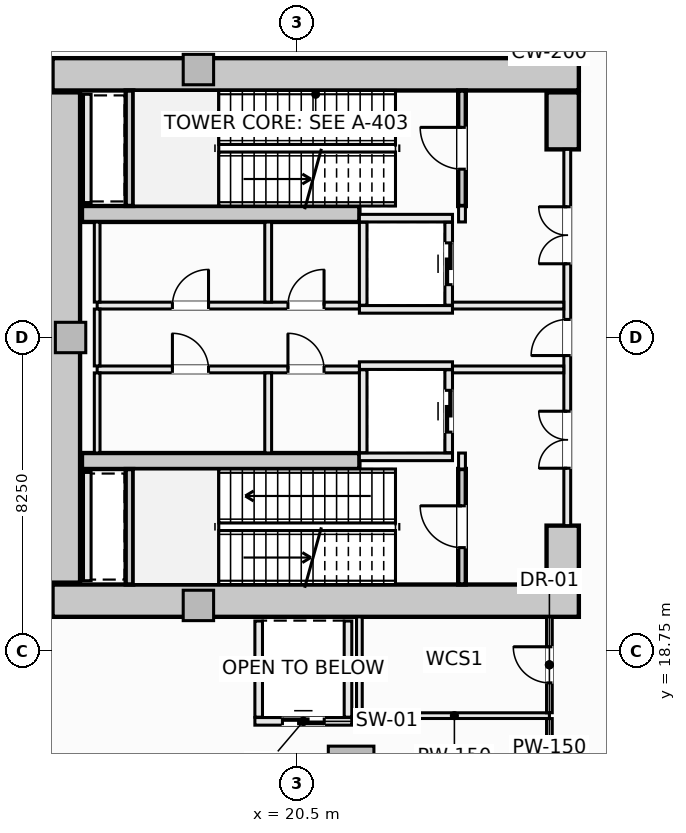
"""IFC4 building model, lengths in metres.
Left out: names, types, materials, properties, quantities, classifications, styles, units other than length and angle.
Written with IfcOpenShell. Run it as: python <this file> out.ifc"""

import sys

from ifc_helpers import new_model, si_unit, direction, frame, frame_2d, origin, origin_2d, place, context, subcontext, project, spatial, rectangle, extrude, element, fill, save


model = new_model("IFC4")
c1 = context("Model", 3, precision=1e-05, world=origin(), true_north=direction((0.0, 1.0)))
c2 = subcontext(c1, "Body", "Model", "MODEL_VIEW")
j1 = project(units=[si_unit("LENGTHUNIT", "METRE"), si_unit("PLANEANGLEUNIT", "RADIAN")], contexts=[c1])
p1 = place(None, origin())
s1 = spatial("IfcSite", under=j1, at=p1, CompositionType="ELEMENT")
p2 = place(p1, origin())
s2 = spatial("IfcBuilding", under=s1, at=p2, CompositionType="ELEMENT")
p3 = place(p2, frame((0.0, 0.0, 21.0)))
s3 = spatial("IfcBuildingStorey", under=s2, at=p3, CompositionType="ELEMENT", Elevation=21.0)
for number, where, z_axis, x_axis in (
    (1, (14.075, 33.925, -0.24), (0.0, 0.0, 1.0), (1.0, 0.0, 0.0)),
    (2, (14.075, 20.075, -0.24), (0.0, 0.0, 1.0), (1.0, 0.0, 0.0)),
):
    element("IfcWall", number, at=place(p3, frame(where, z_axis=z_axis, x_axis=x_axis)), inside=s3, PredefinedType="SHEAR", context=c2, shape_type="SweptSolid", body=[
        extrude(rectangle(XDim=13.85, YDim=0.85, at=frame_2d((6.925, 0.0))), origin(), (0.0, 0.0, 1.0), 5.46),
    ])
p4 = place(p3, frame((14.375, 20.55, -0.24), z_axis=(0.0, 0.0, 1.0), x_axis=(0.0, 1.0, 0.0)))
e3 = element("IfcWall", 3, at=p4, inside=s3, PredefinedType="SHEAR", context=c2, shape_type="SweptSolid", body=[
    extrude(rectangle(XDim=12.9, YDim=0.85, at=frame_2d((6.45, 0.0))), origin(), (0.0, 0.0, 1.0), 5.46),
])
for number, where, z_axis, x_axis in (
    (4, (27.5, 31.95, -0.24), (0.0, 0.0, 1.0), (0.0, 1.0, 0.0)),
    (5, (27.5, 20.55, -0.24), (0.0, 0.0, 1.0), (0.0, 1.0, 0.0)),
):
    element("IfcWall", number, at=place(p3, frame(where, z_axis=z_axis, x_axis=x_axis)), inside=s3, PredefinedType="SHEAR", context=c2, shape_type="SweptSolid", body=[
        extrude(rectangle(XDim=1.5, YDim=0.85, at=frame_2d((0.75, 0.0))), origin(), (0.0, 0.0, 1.0), 5.46),
    ])
for number, where, z_axis, x_axis in (
    (6, (14.85, 30.25, -0.24), (0.0, 0.0, 1.0), (1.0, 0.0, 0.0)),
    (7, (14.85, 23.75, -0.24), (0.0, 0.0, 1.0), (1.0, 0.0, 0.0)),
):
    element("IfcWall", number, at=place(p3, frame(where, z_axis=z_axis, x_axis=x_axis)), inside=s3, PredefinedType="SHEAR", context=c2, shape_type="SweptSolid", body=[
        extrude(rectangle(XDim=7.3, YDim=0.42, at=frame_2d((3.65, 0.0))), origin(), (0.0, 0.0, 1.0), 5.46),
    ])
p5 = place(p3, frame((21.932, 15.648, -0.24), z_axis=(0.0, 0.0, 1.0), x_axis=(1.0, 0.0, 0.0)))
e8 = element("IfcColumn", 8, at=p5, inside=s3, PredefinedType="COLUMN", context=c2, shape_type="SweptSolid", body=[
    extrude(rectangle(XDim=1.2, YDim=1.2, at=origin_2d()), origin(), (0.0, 0.0, 1.0), 5.46),
])
for number, where, z_axis, x_axis in (
    (9, (17.914, 34.05, -0.24), (0.0, 0.0, 1.0), (1.0, 0.0, 0.0)),
    (10, (14.55, 27.0, -0.24), (0.0, 0.0, 1.0), (1.0, 0.0, 0.0)),
    (11, (17.914, 19.95, -0.24), (0.0, 0.0, 1.0), (1.0, 0.0, 0.0)),
):
    element("IfcColumn", number, at=place(p3, frame(where, z_axis=z_axis, x_axis=x_axis)), inside=s3, PredefinedType="PILASTER", context=c2, shape_type="SweptSolid", body=[
        extrude(rectangle(XDim=0.8, YDim=0.8, at=origin_2d()), origin(), (0.0, 0.0, 1.0), 5.46),
    ])
p6 = place(p3, frame((24.85, 30.46, -0.24), z_axis=(0.0, 0.0, 1.0), x_axis=(0.0, 1.0, 0.0)))
e12 = element("IfcWall", 12, at=p6, inside=s3, PredefinedType="SHEAR", context=c2, shape_type="SweptSolid", body=[
    extrude(rectangle(XDim=3.038, YDim=0.2, at=frame_2d((1.519, 0.0))), origin(), (0.0, 0.0, 1.0), 5.46),
])
p7 = place(p6, frame((0.969, 0.0, 0.24)))
e13 = element("IfcOpeningElement", 13, at=p7, cuts=e12, PredefinedType="OPENING", context=c2, shape_type="SweptSolid", body=[
    extrude(rectangle(XDim=1.1, YDim=2.15, at=frame_2d((0.55, 1.075))), frame((0.0, 0.11, 0.0), z_axis=(0.0, -1.0, 0.0), x_axis=(1.0, 0.0, 0.0)), (0.0, 0.0, 1.0), 0.22),
])
p8 = place(p3, frame((16.1, 30.462, -0.24), z_axis=(0.0, 0.0, 1.0), x_axis=(0.0, 1.0, 0.0)))
e14 = element("IfcWall", 14, at=p8, inside=s3, PredefinedType="SHEAR", context=c2, shape_type="SweptSolid", body=[
    extrude(rectangle(XDim=3.036, YDim=0.2, at=frame_2d((1.518, 0.0))), origin(), (0.0, 0.0, 1.0), 5.46),
])
p9 = place(p3, frame((24.85, 20.502, -0.24), z_axis=(0.0, 0.0, 1.0), x_axis=(0.0, 1.0, 0.0)))
e15 = element("IfcWall", 15, at=p9, inside=s3, PredefinedType="SHEAR", context=c2, shape_type="SweptSolid", body=[
    extrude(rectangle(XDim=3.038, YDim=0.2, at=frame_2d((1.519, 0.0))), origin(), (0.0, 0.0, 1.0), 5.46),
])
p10 = place(p9, frame((0.969, 0.0, 0.24)))
e16 = element("IfcOpeningElement", 16, at=p10, cuts=e15, PredefinedType="OPENING", context=c2, shape_type="SweptSolid", body=[
    extrude(rectangle(XDim=1.1, YDim=2.15, at=frame_2d((0.55, 1.075))), frame((0.0, 0.11, 0.0), z_axis=(0.0, -1.0, 0.0), x_axis=(1.0, 0.0, 0.0)), (0.0, 0.0, 1.0), 0.22),
])
p11 = place(p3, frame((16.1, 20.502, -0.24), z_axis=(0.0, 0.0, 1.0), x_axis=(0.0, 1.0, 0.0)))
e17 = element("IfcWall", 17, at=p11, inside=s3, PredefinedType="SHEAR", context=c2, shape_type="SweptSolid", body=[
    extrude(rectangle(XDim=3.036, YDim=0.2, at=frame_2d((1.518, 0.0))), origin(), (0.0, 0.0, 1.0), 5.46),
])
for number, where, z_axis, x_axis in (
    (18, (22.15, 30.14, 0.0), (0.0, 0.0, 1.0), (1.0, 0.0, 0.0)),
    (19, (22.15, 27.74, 0.0), (0.0, 0.0, 1.0), (1.0, 0.0, 0.0)),
):
    element("IfcWall", number, at=place(p3, frame(where, z_axis=z_axis, x_axis=x_axis)), inside=s3, PredefinedType="SOLIDWALL", context=c2, shape_type="SweptSolid", body=[
        extrude(rectangle(XDim=2.45, YDim=0.2, at=frame_2d((1.225, 0.0))), origin(), (0.0, 0.0, 1.0), 5.22),
    ])
p12 = place(p3, frame((22.25, 27.85, 0.0), z_axis=(0.0, 0.0, 1.0), x_axis=(0.0, 1.0, 0.0)))
e20 = element("IfcWall", 20, at=p12, inside=s3, PredefinedType="SOLIDWALL", context=c2, shape_type="SweptSolid", body=[
    extrude(rectangle(XDim=2.18, YDim=0.2, at=frame_2d((1.09, 0.0))), origin(), (0.0, 0.0, 1.0), 5.22),
])
p13 = place(p3, frame((24.5, 27.85, 0.0), z_axis=(0.0, 0.0, 1.0), x_axis=(0.0, 1.0, 0.0)))
e21 = element("IfcWall", 21, at=p13, inside=s3, PredefinedType="SOLIDWALL", context=c2, shape_type="SweptSolid", body=[
    extrude(rectangle(XDim=2.18, YDim=0.2, at=frame_2d((1.09, 0.0))), origin(), (0.0, 0.0, 1.0), 5.22),
])
p14 = place(p13, frame((0.54, 0.0, 0.0)))
e22 = element("IfcOpeningElement", 22, at=p14, cuts=e21, PredefinedType="OPENING", context=c2, shape_type="SweptSolid", body=[
    extrude(rectangle(XDim=1.1, YDim=2.2, at=frame_2d((0.55, 1.1))), frame((0.0, 0.11, 0.0), z_axis=(0.0, -1.0, 0.0), x_axis=(1.0, 0.0, 0.0)), (0.0, 0.0, 1.0), 0.22),
])
for number, where, z_axis, x_axis in (
    (23, (22.15, 26.26, 0.0), (0.0, 0.0, 1.0), (1.0, 0.0, 0.0)),
    (24, (22.15, 23.86, 0.0), (0.0, 0.0, 1.0), (1.0, 0.0, 0.0)),
):
    element("IfcWall", number, at=place(p3, frame(where, z_axis=z_axis, x_axis=x_axis)), inside=s3, PredefinedType="SOLIDWALL", context=c2, shape_type="SweptSolid", body=[
        extrude(rectangle(XDim=2.45, YDim=0.2, at=frame_2d((1.225, 0.0))), origin(), (0.0, 0.0, 1.0), 5.22),
    ])
p15 = place(p3, frame((22.25, 23.97, 0.0), z_axis=(0.0, 0.0, 1.0), x_axis=(0.0, 1.0, 0.0)))
e25 = element("IfcWall", 25, at=p15, inside=s3, PredefinedType="SOLIDWALL", context=c2, shape_type="SweptSolid", body=[
    extrude(rectangle(XDim=2.18, YDim=0.2, at=frame_2d((1.09, 0.0))), origin(), (0.0, 0.0, 1.0), 5.22),
])
p16 = place(p3, frame((24.5, 23.97, 0.0), z_axis=(0.0, 0.0, 1.0), x_axis=(0.0, 1.0, 0.0)))
e26 = element("IfcWall", 26, at=p16, inside=s3, PredefinedType="SOLIDWALL", context=c2, shape_type="SweptSolid", body=[
    extrude(rectangle(XDim=2.18, YDim=0.2, at=frame_2d((1.09, 0.0))), origin(), (0.0, 0.0, 1.0), 5.22),
])
p17 = place(p16, frame((0.54, 0.0, 0.0)))
e27 = element("IfcOpeningElement", 27, at=p17, cuts=e26, PredefinedType="OPENING", context=c2, shape_type="SweptSolid", body=[
    extrude(rectangle(XDim=1.1, YDim=2.2, at=frame_2d((0.55, 1.1))), frame((0.0, 0.11, 0.0), z_axis=(0.0, -1.0, 0.0), x_axis=(1.0, 0.0, 0.0)), (0.0, 0.0, 1.0), 0.22),
])
p18 = place(p3, frame((19.4, 16.9, 0.0), z_axis=(0.0, 0.0, 1.0), x_axis=(1.0, 0.0, 0.0)))
e28 = element("IfcWall", 28, at=p18, inside=s3, PredefinedType="SOLIDWALL", context=c2, shape_type="SweptSolid", body=[
    extrude(rectangle(XDim=2.55, YDim=0.2, at=frame_2d((1.275, 0.0))), origin(), (0.0, 0.0, 1.0), 5.22),
])
p19 = place(p18, frame((0.725, 0.0, 0.0)))
e29 = element("IfcOpeningElement", 29, at=p19, cuts=e28, PredefinedType="OPENING", context=c2, shape_type="SweptSolid", body=[
    extrude(rectangle(XDim=1.1, YDim=2.2, at=frame_2d((0.55, 1.1))), frame((0.0, 0.11, 0.0), z_axis=(0.0, -1.0, 0.0), x_axis=(1.0, 0.0, 0.0)), (0.0, 0.0, 1.0), 0.22),
])
for number, where, z_axis, x_axis in (
    (30, (19.5, 17.01, 0.0), (0.0, 0.0, 1.0), (0.0, 1.0, 0.0)),
    (31, (21.85, 17.01, 0.0), (0.0, 0.0, 1.0), (0.0, 1.0, 0.0)),
):
    element("IfcWall", number, at=place(p3, frame(where, z_axis=z_axis, x_axis=x_axis)), inside=s3, PredefinedType="SOLIDWALL", context=c2, shape_type="SweptSolid", body=[
        extrude(rectangle(XDim=2.53, YDim=0.2, at=frame_2d((1.265, 0.0))), origin(), (0.0, 0.0, 1.0), 5.22),
    ])
for number, where, z_axis, x_axis in (
    (32, (14.99, 30.55, 0.0), (0.0, 0.0, 1.0), (0.0, 1.0, 0.0)),
    (33, (14.99, 20.6, 0.0), (0.0, 0.0, 1.0), (0.0, 1.0, 0.0)),
):
    element("IfcWall", number, at=place(p3, frame(where, z_axis=z_axis, x_axis=x_axis)), inside=s3, PredefinedType="SOLIDWALL", context=c2, shape_type="SweptSolid", body=[
        extrude(rectangle(XDim=2.85, YDim=0.2, at=frame_2d((1.425, 0.0))), origin(), (0.0, 0.0, 1.0), 5.22),
    ])
for number, where, z_axis, x_axis in (
    (34, (24.85, 23.54, 0.0), (0.0, 0.0, 1.0), (0.0, 1.0, 0.0)),
    (35, (24.85, 30.04, 0.0), (0.0, 0.0, 1.0), (0.0, 1.0, 0.0)),
):
    element("IfcWall", number, at=place(p3, frame(where, z_axis=z_axis, x_axis=x_axis)), inside=s3, PredefinedType="SOLIDWALL", context=c2, shape_type="SweptSolid", body=[
        extrude(rectangle(XDim=0.42, YDim=0.18, at=frame_2d((0.21, 0.0))), origin(), (0.0, 0.0, 1.0), 5.22),
    ])
p20 = place(p3, frame((27.62, 22.05, 0.0), z_axis=(0.0, 0.0, 1.0), x_axis=(0.0, 1.0, 0.0)))
e36 = element("IfcWall", 36, at=p20, inside=s3, PredefinedType="SOLIDWALL", context=c2, shape_type="SweptSolid", body=[
    extrude(rectangle(XDim=9.9, YDim=0.18, at=frame_2d((4.95, 0.0))), origin(), (0.0, 0.0, 1.0), 4.312),
])
p21 = place(p20, frame((4.475, 0.0, 0.0)))
e37 = element("IfcOpeningElement", 37, at=p21, cuts=e36, PredefinedType="OPENING", context=c2, shape_type="SweptSolid", body=[
    extrude(rectangle(XDim=0.95, YDim=2.1, at=frame_2d((0.475, 1.05))), frame((0.0, 0.1, 0.0), z_axis=(0.0, -1.0, 0.0), x_axis=(1.0, 0.0, 0.0)), (0.0, 0.0, 1.0), 0.2),
])
p22 = place(p20, frame((6.89, 0.0, 0.0)))
e38 = element("IfcOpeningElement", 38, at=p22, cuts=e36, PredefinedType="OPENING", context=c2, shape_type="SweptSolid", body=[
    extrude(rectangle(XDim=1.5, YDim=2.2, at=frame_2d((0.75, 1.1))), frame((0.0, 0.1, 0.0), z_axis=(0.0, -1.0, 0.0), x_axis=(1.0, 0.0, 0.0)), (0.0, 0.0, 1.0), 0.2),
])
p23 = place(p20, frame((1.51, 0.0, 0.0)))
e39 = element("IfcOpeningElement", 39, at=p23, cuts=e36, PredefinedType="OPENING", context=c2, shape_type="SweptSolid", body=[
    extrude(rectangle(XDim=1.5, YDim=2.2, at=frame_2d((0.75, 1.1))), frame((0.0, 0.1, 0.0), z_axis=(0.0, -1.0, 0.0), x_axis=(1.0, 0.0, 0.0)), (0.0, 0.0, 1.0), 0.2),
])
p24 = place(p3, frame((15.25, 27.84, 0.0), z_axis=(0.0, 0.0, 1.0), x_axis=(1.0, 0.0, 0.0)))
e40 = element("IfcWall", 40, at=p24, inside=s3, PredefinedType="SOLIDWALL", context=c2, shape_type="SweptSolid", body=[
    extrude(rectangle(XDim=6.9, YDim=0.18, at=frame_2d((3.45, 0.0))), origin(), (0.0, 0.0, 1.0), 5.22),
])
p25 = place(p24, frame((5.02, 0.0, 0.0)))
e41 = element("IfcOpeningElement", 41, at=p25, cuts=e40, PredefinedType="OPENING", context=c2, shape_type="SweptSolid", body=[
    extrude(rectangle(XDim=0.95, YDim=2.1, at=frame_2d((0.475, 1.05))), frame((0.0, 0.1, 0.0), z_axis=(0.0, -1.0, 0.0), x_axis=(1.0, 0.0, 0.0)), (0.0, 0.0, 1.0), 0.2),
])
p26 = place(p24, frame((1.98, 0.0, 0.0)))
e42 = element("IfcOpeningElement", 42, at=p26, cuts=e40, PredefinedType="OPENING", context=c2, shape_type="SweptSolid", body=[
    extrude(rectangle(XDim=0.95, YDim=2.1, at=frame_2d((0.475, 1.05))), frame((0.0, 0.1, 0.0), z_axis=(0.0, -1.0, 0.0), x_axis=(1.0, 0.0, 0.0)), (0.0, 0.0, 1.0), 0.2),
])
p27 = place(p3, frame((24.6, 27.84, 0.0), z_axis=(0.0, 0.0, 1.0), x_axis=(1.0, 0.0, 0.0)))
e43 = element("IfcWall", 43, at=p27, inside=s3, PredefinedType="SOLIDWALL", context=c2, shape_type="SweptSolid", body=[
    extrude(rectangle(XDim=2.928, YDim=0.18, at=frame_2d((1.464, 0.0))), origin(), (0.0, 0.0, 1.0), 5.22),
])
p28 = place(p3, frame((15.25, 26.16, 0.0), z_axis=(0.0, 0.0, 1.0), x_axis=(1.0, 0.0, 0.0)))
e44 = element("IfcWall", 44, at=p28, inside=s3, PredefinedType="SOLIDWALL", context=c2, shape_type="SweptSolid", body=[
    extrude(rectangle(XDim=6.9, YDim=0.18, at=frame_2d((3.45, 0.0))), origin(), (0.0, 0.0, 1.0), 5.22),
])
p29 = place(p28, frame((5.02, 0.0, 0.0)))
e45 = element("IfcOpeningElement", 45, at=p29, cuts=e44, PredefinedType="OPENING", context=c2, shape_type="SweptSolid", body=[
    extrude(rectangle(XDim=0.95, YDim=2.1, at=frame_2d((0.475, 1.05))), frame((0.0, 0.1, 0.0), z_axis=(0.0, -1.0, 0.0), x_axis=(1.0, 0.0, 0.0)), (0.0, 0.0, 1.0), 0.2),
])
p30 = place(p28, frame((1.98, 0.0, 0.0)))
e46 = element("IfcOpeningElement", 46, at=p30, cuts=e44, PredefinedType="OPENING", context=c2, shape_type="SweptSolid", body=[
    extrude(rectangle(XDim=0.95, YDim=2.1, at=frame_2d((0.475, 1.05))), frame((0.0, 0.1, 0.0), z_axis=(0.0, -1.0, 0.0), x_axis=(1.0, 0.0, 0.0)), (0.0, 0.0, 1.0), 0.2),
])
p31 = place(p3, frame((24.6, 26.16, 0.0), z_axis=(0.0, 0.0, 1.0), x_axis=(1.0, 0.0, 0.0)))
e47 = element("IfcWall", 47, at=p31, inside=s3, PredefinedType="SOLIDWALL", context=c2, shape_type="SweptSolid", body=[
    extrude(rectangle(XDim=2.928, YDim=0.18, at=frame_2d((1.464, 0.0))), origin(), (0.0, 0.0, 1.0), 5.22),
])
p32 = place(p3, frame((15.25, 23.962, 0.0), z_axis=(0.0, 0.0, 1.0), x_axis=(0.0, 1.0, 0.0)))
e48 = element("IfcWall", 48, at=p32, inside=s3, PredefinedType="PARTITIONING", context=c2, shape_type="SweptSolid", body=[
    extrude(rectangle(XDim=2.106, YDim=0.15, at=frame_2d((1.053, 0.0))), origin(), (0.0, 0.0, 1.0), 5.22),
])
p33 = place(p3, frame((15.25, 26.252, 0.0), z_axis=(0.0, 0.0, 1.0), x_axis=(0.0, 1.0, 0.0)))
e49 = element("IfcWall", 49, at=p33, inside=s3, PredefinedType="PARTITIONING", context=c2, shape_type="SweptSolid", body=[
    extrude(rectangle(XDim=1.496, YDim=0.15, at=frame_2d((0.748, 0.0))), origin(), (0.0, 0.0, 1.0), 5.22),
])
p34 = place(p3, frame((15.25, 27.932, 0.0), z_axis=(0.0, 0.0, 1.0), x_axis=(0.0, 1.0, 0.0)))
e50 = element("IfcWall", 50, at=p34, inside=s3, PredefinedType="PARTITIONING", context=c2, shape_type="SweptSolid", body=[
    extrude(rectangle(XDim=2.106, YDim=0.15, at=frame_2d((1.053, 0.0))), origin(), (0.0, 0.0, 1.0), 5.22),
])
for number, where, z_axis, x_axis in (
    (51, (19.75, 23.962, 0.0), (0.0, 0.0, 1.0), (0.0, 1.0, 0.0)),
    (52, (19.75, 27.932, 0.0), (0.0, 0.0, 1.0), (0.0, 1.0, 0.0)),
):
    element("IfcWall", number, at=place(p3, frame(where, z_axis=z_axis, x_axis=x_axis)), inside=s3, PredefinedType="SOLIDWALL", context=c2, shape_type="SweptSolid", body=[
        extrude(rectangle(XDim=2.106, YDim=0.18, at=frame_2d((1.053, 0.0))), origin(), (0.0, 0.0, 1.0), 5.22),
    ])
p35 = place(p3, frame((22.15, 17.05, 0.0), z_axis=(0.0, 0.0, 1.0), x_axis=(1.0, 0.0, 0.0)))
e53 = element("IfcWall", 53, at=p35, inside=s3, PredefinedType="PARTITIONING", context=c2, shape_type="SweptSolid", body=[
    extrude(rectangle(XDim=5.0, YDim=0.15, at=frame_2d((2.5, 0.0))), origin(), (0.0, 0.0, 1.0), 5.22),
])
p36 = place(p3, frame((22.15, 17.127, 0.0), z_axis=(0.0, 0.0, 1.0), x_axis=(0.0, 1.0, 0.0)))
e54 = element("IfcWall", 54, at=p36, inside=s3, PredefinedType="PARTITIONING", context=c2, shape_type="SweptSolid", body=[
    extrude(rectangle(XDim=2.521, YDim=0.15, at=frame_2d((1.26, 0.0))), origin(), (0.0, 0.0, 1.0), 5.22),
])
p37 = place(p3, frame((27.15, 13.67, 0.0), z_axis=(0.0, 0.0, 1.0), x_axis=(0.0, 1.0, 0.0)))
e55 = element("IfcWall", 55, at=p37, inside=s3, PredefinedType="PARTITIONING", context=c2, shape_type="SweptSolid", body=[
    extrude(rectangle(XDim=3.303, YDim=0.15, at=frame_2d((1.651, 0.0))), origin(), (0.0, 0.0, 1.0), 5.22),
])
p38 = place(p3, frame((27.15, 17.127, 0.0), z_axis=(0.0, 0.0, 1.0), x_axis=(0.0, 1.0, 0.0)))
e56 = element("IfcWall", 56, at=p38, inside=s3, PredefinedType="PARTITIONING", context=c2, shape_type="SweptSolid", body=[
    extrude(rectangle(XDim=2.521, YDim=0.15, at=frame_2d((1.26, 0.0))), origin(), (0.0, 0.0, 1.0), 5.22),
])
p39 = place(p38, frame((0.785, 0.0, 0.0)))
e57 = element("IfcOpeningElement", 57, at=p39, cuts=e56, PredefinedType="OPENING", context=c2, shape_type="SweptSolid", body=[
    extrude(rectangle(XDim=0.95, YDim=2.1, at=frame_2d((0.475, 1.05))), frame((0.0, 0.085, 0.0), z_axis=(0.0, -1.0, 0.0), x_axis=(1.0, 0.0, 0.0)), (0.0, 0.0, 1.0), 0.17),
])
p40 = place(p3, frame((27.25, 34.352, 0.0), z_axis=(0.0, 0.0, 1.0), x_axis=(0.0, 1.0, 0.0)))
e58 = element("IfcWall", 58, at=p40, inside=s3, PredefinedType="PARTITIONING", context=c2, shape_type="SweptSolid", body=[
    extrude(rectangle(XDim=0.606, YDim=0.12, at=frame_2d((0.303, 0.0))), origin(), (0.0, 0.0, 1.0), 5.22),
])
p41 = place(p7, origin())
e59 = element("IfcDoor", 59, at=p41, inside=s3, OperationType="SINGLE_SWING_RIGHT", PredefinedType="DOOR", context=c2, shape_type="SweptSolid", body=[
    extrude(rectangle(XDim=1.1, YDim=2.15, at=frame_2d((0.55, 1.075))), frame((0.0, 0.025, 0.0), z_axis=(0.0, -1.0, 0.0), x_axis=(1.0, 0.0, 0.0)), (0.0, 0.0, 1.0), 0.05),
])
fill(e13, e59)
p42 = place(p10, origin())
e60 = element("IfcDoor", 60, at=p42, inside=s3, OperationType="SINGLE_SWING_RIGHT", PredefinedType="DOOR", context=c2, shape_type="SweptSolid", body=[
    extrude(rectangle(XDim=1.1, YDim=2.15, at=frame_2d((0.55, 1.075))), frame((0.0, 0.025, 0.0), z_axis=(0.0, -1.0, 0.0), x_axis=(1.0, 0.0, 0.0)), (0.0, 0.0, 1.0), 0.05),
])
fill(e16, e60)
p43 = place(p14, origin())
e61 = element("IfcDoor", 61, at=p43, inside=s3, OperationType="SLIDING_TO_LEFT", PredefinedType="DOOR", context=c2, shape_type="SweptSolid", body=[
    extrude(rectangle(XDim=1.1, YDim=2.2, at=frame_2d((0.55, 1.1))), frame((0.0, 0.025, 0.0), z_axis=(0.0, -1.0, 0.0), x_axis=(1.0, 0.0, 0.0)), (0.0, 0.0, 1.0), 0.05),
])
fill(e22, e61)
p44 = place(p17, origin())
e62 = element("IfcDoor", 62, at=p44, inside=s3, OperationType="SLIDING_TO_LEFT", PredefinedType="DOOR", context=c2, shape_type="SweptSolid", body=[
    extrude(rectangle(XDim=1.1, YDim=2.2, at=frame_2d((0.55, 1.1))), frame((0.0, 0.025, 0.0), z_axis=(0.0, -1.0, 0.0), x_axis=(1.0, 0.0, 0.0)), (0.0, 0.0, 1.0), 0.05),
])
fill(e27, e62)
p45 = place(p19, origin())
e63 = element("IfcDoor", 63, at=p45, inside=s3, OperationType="SLIDING_TO_LEFT", PredefinedType="DOOR", context=c2, shape_type="SweptSolid", body=[
    extrude(rectangle(XDim=1.1, YDim=2.2, at=frame_2d((0.55, 1.1))), frame((0.0, 0.025, 0.0), z_axis=(0.0, -1.0, 0.0), x_axis=(1.0, 0.0, 0.0)), (0.0, 0.0, 1.0), 0.05),
])
fill(e29, e63)
p46 = place(p21, origin())
e64 = element("IfcDoor", 64, at=p46, inside=s3, OperationType="SINGLE_SWING_LEFT", PredefinedType="DOOR", context=c2, shape_type="SweptSolid", body=[
    extrude(rectangle(XDim=0.95, YDim=2.1, at=frame_2d((0.475, 1.05))), frame((0.0, 0.025, 0.0), z_axis=(0.0, -1.0, 0.0), x_axis=(1.0, 0.0, 0.0)), (0.0, 0.0, 1.0), 0.05),
])
fill(e37, e64)
p47 = place(p22, origin())
e65 = element("IfcDoor", 65, at=p47, inside=s3, OperationType="DOUBLE_DOOR_SINGLE_SWING", PredefinedType="DOOR", context=c2, shape_type="SweptSolid", body=[
    extrude(rectangle(XDim=1.5, YDim=2.2, at=frame_2d((0.75, 1.1))), frame((0.0, 0.025, 0.0), z_axis=(0.0, -1.0, 0.0), x_axis=(1.0, 0.0, 0.0)), (0.0, 0.0, 1.0), 0.05),
])
fill(e38, e65)
p48 = place(p23, origin())
e66 = element("IfcDoor", 66, at=p48, inside=s3, OperationType="DOUBLE_DOOR_SINGLE_SWING", PredefinedType="DOOR", context=c2, shape_type="SweptSolid", body=[
    extrude(rectangle(XDim=1.5, YDim=2.2, at=frame_2d((0.75, 1.1))), frame((0.0, 0.025, 0.0), z_axis=(0.0, -1.0, 0.0), x_axis=(1.0, 0.0, 0.0)), (0.0, 0.0, 1.0), 0.05),
])
fill(e39, e66)
p49 = place(p25, origin())
e67 = element("IfcDoor", 67, at=p49, inside=s3, OperationType="SINGLE_SWING_RIGHT", PredefinedType="DOOR", context=c2, shape_type="SweptSolid", body=[
    extrude(rectangle(XDim=0.95, YDim=2.1, at=frame_2d((0.475, 1.05))), frame((0.0, 0.025, 0.0), z_axis=(0.0, -1.0, 0.0), x_axis=(1.0, 0.0, 0.0)), (0.0, 0.0, 1.0), 0.05),
])
fill(e41, e67)
p50 = place(p29, origin())
e68 = element("IfcDoor", 68, at=p50, inside=s3, OperationType="SINGLE_SWING_LEFT", PredefinedType="DOOR", context=c2, shape_type="SweptSolid", body=[
    extrude(rectangle(XDim=0.95, YDim=2.1, at=frame_2d((0.475, 1.05))), frame((0.0, 0.025, 0.0), z_axis=(0.0, -1.0, 0.0), x_axis=(1.0, 0.0, 0.0)), (0.0, 0.0, 1.0), 0.05),
])
fill(e45, e68)
p51 = place(p26, origin())
e69 = element("IfcDoor", 69, at=p51, inside=s3, OperationType="SINGLE_SWING_RIGHT", PredefinedType="DOOR", context=c2, shape_type="SweptSolid", body=[
    extrude(rectangle(XDim=0.95, YDim=2.1, at=frame_2d((0.475, 1.05))), frame((0.0, 0.025, 0.0), z_axis=(0.0, -1.0, 0.0), x_axis=(1.0, 0.0, 0.0)), (0.0, 0.0, 1.0), 0.05),
])
fill(e42, e69)
p52 = place(p30, origin())
e70 = element("IfcDoor", 70, at=p52, inside=s3, OperationType="SINGLE_SWING_LEFT", PredefinedType="DOOR", context=c2, shape_type="SweptSolid", body=[
    extrude(rectangle(XDim=0.95, YDim=2.1, at=frame_2d((0.475, 1.05))), frame((0.0, 0.025, 0.0), z_axis=(0.0, -1.0, 0.0), x_axis=(1.0, 0.0, 0.0)), (0.0, 0.0, 1.0), 0.05),
])
fill(e46, e70)
p53 = place(p39, origin())
e71 = element("IfcDoor", 71, at=p53, inside=s3, OperationType="SINGLE_SWING_RIGHT", PredefinedType="DOOR", context=c2, shape_type="SweptSolid", body=[
    extrude(rectangle(XDim=0.95, YDim=2.1, at=frame_2d((0.475, 1.05))), frame((0.0, 0.025, 0.0), z_axis=(0.0, -1.0, 0.0), x_axis=(1.0, 0.0, 0.0)), (0.0, 0.0, 1.0), 0.05),
])
fill(e57, e71)
save(model, sys.argv[1])
